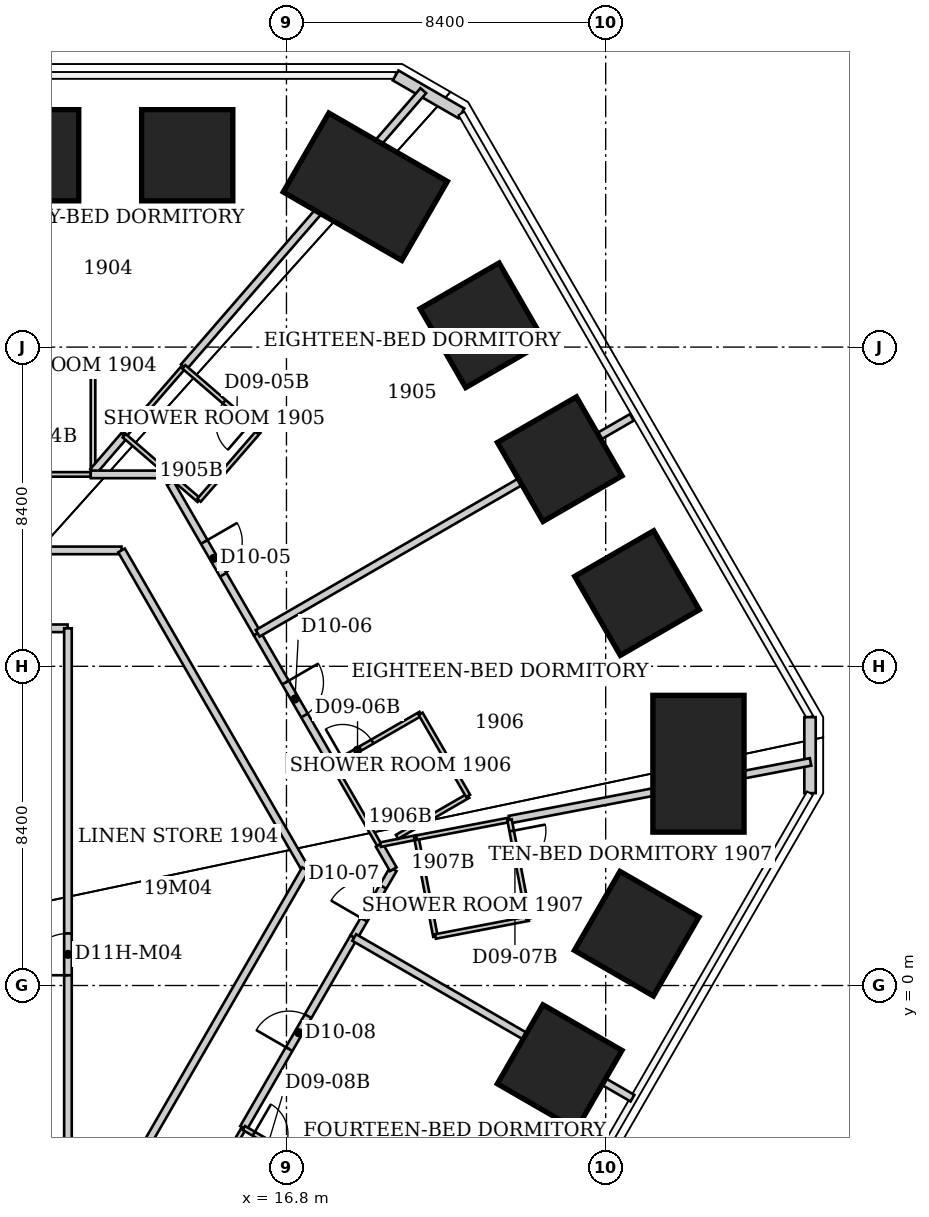
"""IFC4 building model, lengths in metres.
Left out: names, types, materials, properties, quantities, classifications, styles, units other than length and angle.
Written with IfcOpenShell. Run it as: python <this file> out.ifc"""

import sys

from ifc_helpers import new_model, si_unit, direction, frame, frame_2d, origin, origin_2d, place, context, subcontext, project, spatial, rectangle, extrude, element, fill, save


model = new_model("IFC4")
c1 = context("Model", 3, precision=1e-05, world=origin(), true_north=direction((0.0, 1.0)))
c2 = subcontext(c1, "Body", "Model", "MODEL_VIEW")
j1 = project(units=[si_unit("LENGTHUNIT", "METRE"), si_unit("PLANEANGLEUNIT", "RADIAN")], contexts=[c1])
p1 = place(None, origin())
s1 = spatial("IfcSite", under=j1, at=p1, CompositionType="ELEMENT")
p2 = place(p1, origin())
s2 = spatial("IfcBuilding", under=s1, at=p2, CompositionType="ELEMENT")
p3 = place(p2, frame((0.0, 0.0, 80.0)))
s3 = spatial("IfcBuildingStorey", under=s2, at=p3, CompositionType="ELEMENT", Elevation=80.0)
p4 = place(p3, frame((10.135, 21.849, 0.0), z_axis=(-0.017011430722, -0.036719012729, 0.999180827142), x_axis=(-0.001112013962, 0.99932551115, 0.036705397281)))
e1 = element("IfcColumn", 1, at=p4, inside=s3, PredefinedType="COLUMN", context=c2, shape_type="SweptSolid", body=[
    extrude(rectangle(XDim=2.4, YDim=2.4, at=origin_2d()), origin(), (0.0, 0.0, 1.0), 3.803),
])
p5 = place(p3, frame((14.189, 21.848, 0.0), z_axis=(-0.0238126955, -0.036713913278, 0.999042063231), x_axis=(-0.001457588232, 0.999325647249, 0.036689592354)))
e2 = element("IfcColumn", 2, at=p5, inside=s3, PredefinedType="COLUMN", context=c2, shape_type="SweptSolid", body=[
    extrude(rectangle(XDim=2.4, YDim=2.4, at=origin_2d()), origin(), (0.0, 0.0, 1.0), 3.804),
])
p6 = place(p3, frame((18.875, 21.02, 0.0), z_axis=(-0.031958280822, -0.035551983084, 0.998856708836), x_axis=(0.499520046627, 0.86503883454, 0.046771120948)))
e3 = element("IfcColumn", 3, at=p6, inside=s3, PredefinedType="COLUMN", context=c2, shape_type="SweptSolid", body=[
    extrude(rectangle(XDim=2.4, YDim=3.6, at=origin_2d()), origin(), (0.0, 0.0, 1.0), 3.804),
])
p7 = place(p3, frame((21.956, 17.374, 0.0), z_axis=(-0.036324594823, -0.028751622758, 0.998926357646), x_axis=(0.865203233746, 0.499322177845, 0.045833688787)))
e4 = element("IfcColumn", 4, at=p7, inside=s3, PredefinedType="COLUMN", context=c2, shape_type="SweptSolid", body=[
    extrude(rectangle(XDim=2.4, YDim=2.4, at=origin_2d()), origin(), (0.0, 0.0, 1.0), 3.804),
])
p8 = place(p3, frame((23.99, 13.851, 0.0), z_axis=(-0.039726869437, -0.02291194247, 0.998947855865), x_axis=(0.865344046472, 0.499075645542, 0.045860454239)))
e5 = element("IfcColumn", 5, at=p8, inside=s3, PredefinedType="COLUMN", context=c2, shape_type="SweptSolid", body=[
    extrude(rectangle(XDim=2.4, YDim=2.4, at=origin_2d()), origin(), (0.0, 0.0, 1.0), 3.804),
])
p9 = place(p3, frame((26.024, 10.327, 0.0), z_axis=(-0.043063214726, -0.017135437156, 0.998925390773), x_axis=(0.864497674409, 0.500540860582, 0.045854310909)))
e6 = element("IfcColumn", 6, at=p9, inside=s3, PredefinedType="COLUMN", context=c2, shape_type="SweptSolid", body=[
    extrude(rectangle(XDim=2.4, YDim=2.4, at=origin_2d()), origin(), (0.0, 0.0, 1.0), 3.804),
])
p10 = place(p3, frame((27.641, 5.836, 0.0), z_axis=(-0.04678227982, -0.009882676395, 0.998856221386), x_axis=(0.998905103639, -0.000352183695, 0.046781084758)))
e7 = element("IfcColumn", 7, at=p10, inside=s3, PredefinedType="COLUMN", context=c2, shape_type="SweptSolid", body=[
    extrude(rectangle(XDim=2.4, YDim=3.6, at=origin_2d()), origin(), (0.0, 0.0, 1.0), 3.804),
])
p11 = place(p3, frame((26.016, 1.364, 0.0), z_axis=(-0.043710081557, -0.002246479963, 0.99904173191), x_axis=(0.864490436005, -0.501307983687, 0.036695933665)))
e8 = element("IfcColumn", 8, at=p11, inside=s3, PredefinedType="COLUMN", context=c2, shape_type="SweptSolid", body=[
    extrude(rectangle(XDim=2.4, YDim=2.4, at=origin_2d()), origin(), (0.0, 0.0, 1.0), 3.804),
])
p12 = place(p3, frame((23.989, -2.147, 0.0), z_axis=(-0.040313871888, 0.003594867557, 0.999180598621), x_axis=(0.865292276739, -0.499921607788, 0.036710514605)))
e9 = element("IfcColumn", 9, at=p12, inside=s3, PredefinedType="COLUMN", context=c2, shape_type="SweptSolid", body=[
    extrude(rectangle(XDim=2.4, YDim=2.4, at=origin_2d()), origin(), (0.0, 0.0, 1.0), 3.803),
])
for number, where, z_axis, x_axis in (
    (10, (19.672, 23.949, 0.0), (0.0, 0.0, 1.0), (0.866, -0.5, 0.0)),
    (11, (30.576, 7.062, 0.0), (0.0, 0.0, 1.0), (0.0, -1.0, 0.0)),
):
    element("IfcWall", number, at=place(p3, frame(where, z_axis=z_axis, x_axis=x_axis)), inside=s3, PredefinedType="SOLIDWALL", context=c2, shape_type="SweptSolid", body=[
        extrude(rectangle(XDim=2.0, YDim=0.3, at=frame_2d((1.0, 0.0))), origin(), (0.0, 0.0, 1.0), 3.64),
    ])
p13 = place(p3, frame((8.65, 11.45, 0.0), z_axis=(0.0, 0.0, 1.0), x_axis=(1.0, 0.0, 0.0)))
e12 = element("IfcWall", 12, at=p13, inside=s3, PredefinedType="PARTITIONING", context=c2, shape_type="SweptSolid", body=[
    extrude(rectangle(XDim=3.81, YDim=0.2, at=frame_2d((1.905, 0.0))), origin(), (0.0, 0.0, 1.0), 3.64),
])
p14 = place(p3, frame((11.04, 9.4, 0.0), z_axis=(0.0, 0.0, 1.0), x_axis=(-1.0, 0.0, 0.0)))
e13 = element("IfcWall", 13, at=p14, inside=s3, PredefinedType="PARTITIONING", context=c2, shape_type="SweptSolid", body=[
    extrude(rectangle(XDim=2.39, YDim=0.2, at=frame_2d((1.195, 0.0))), origin(), (0.0, 0.0, 1.0), 3.64),
])
p15 = place(p3, frame((11.05, -7.76, 0.0), z_axis=(0.0, 0.0, 1.0), x_axis=(0.0, 1.0, 0.0)))
e14 = element("IfcWall", 14, at=p15, inside=s3, PredefinedType="PARTITIONING", context=c2, shape_type="SweptSolid", body=[
    extrude(rectangle(XDim=17.16, YDim=0.2, at=frame_2d((8.58, 0.0))), origin(), (0.0, 0.0, 1.0), 3.64),
])
p16 = place(p15, frame((8.03, 0.0, 0.0)))
e15 = element("IfcOpeningElement", 15, at=p16, cuts=e14, PredefinedType="OPENING", context=c2, shape_type="SweptSolid", body=[
    extrude(rectangle(XDim=1.1, YDim=2.2, at=frame_2d((0.55, 1.1))), frame((0.0, 0.1, 0.0), z_axis=(0.0, -1.0, 0.0), x_axis=(1.0, 0.0, 0.0)), (0.0, 0.0, 1.0), 0.2),
])
p17 = place(p3, frame((11.65, 13.45, 0.0), z_axis=(0.0, 0.0, 1.0), x_axis=(-1.0, 0.0, 0.0)))
e16 = element("IfcWall", 16, at=p17, inside=s3, PredefinedType="PARTITIONING", context=c2, shape_type="SweptSolid", body=[
    extrude(rectangle(XDim=2.44, YDim=0.12, at=frame_2d((1.22, 0.0))), origin(), (0.0, 0.0, 1.0), 3.64),
])
p18 = place(p3, frame((11.71, 13.605, 0.0), z_axis=(0.0, 0.0, 1.0), x_axis=(0.0, 1.0, 0.0)))
e17 = element("IfcWall", 17, at=p18, inside=s3, PredefinedType="PARTITIONING", context=c2, shape_type="SweptSolid", body=[
    extrude(rectangle(XDim=2.515, YDim=0.12, at=frame_2d((1.258, 0.0))), origin(), (0.0, 0.0, 1.0), 3.64),
])
p19 = place(p3, frame((11.71, 16.12, 0.0), z_axis=(0.0, 0.0, 1.0), x_axis=(-1.0, 0.0, 0.0)))
e18 = element("IfcWall", 18, at=p19, inside=s3, PredefinedType="PARTITIONING", context=c2, shape_type="SweptSolid", body=[
    extrude(rectangle(XDim=2.5, YDim=0.12, at=frame_2d((1.25, 0.0))), origin(), (0.0, 0.0, 1.0), 3.64),
])
p20 = place(p3, frame((11.715, 13.526, 0.0), z_axis=(0.0, 0.0, 1.0), x_axis=(0.653334457224, 0.757069406993, 0.0)))
e19 = element("IfcWall", 19, at=p20, inside=s3, PredefinedType="PARTITIONING", context=c2, shape_type="SweptSolid", body=[
    extrude(rectangle(XDim=1.247, YDim=0.2, at=frame_2d((0.624, 0.0))), origin(), (0.0, 0.0, 1.0), 3.64),
])
p21 = place(p3, frame((12.46, 11.45, 0.0), z_axis=(0.0, 0.0, 1.0), x_axis=(0.499704269421, -0.866196076603, 0.0)))
e20 = element("IfcWall", 20, at=p21, inside=s3, PredefinedType="PARTITIONING", context=c2, shape_type="SweptSolid", body=[
    extrude(rectangle(XDim=9.686, YDim=0.2, at=frame_2d((4.843, 0.0))), origin(), (0.0, 0.0, 1.0), 3.64),
])
p22 = place(p3, frame((12.53, 14.47, 0.0), z_axis=(0.0, 0.0, 1.0), x_axis=(0.655194291402, 0.755460416245, 0.0)))
e21 = element("IfcWall", 21, at=p22, inside=s3, PredefinedType="PARTITIONING", context=c2, shape_type="SweptSolid", body=[
    extrude(rectangle(XDim=2.396, YDim=0.12, at=frame_2d((1.198, 0.0))), origin(), (0.0, 0.0, 1.0), 3.64),
])
p23 = place(p3, frame((12.53, 14.47, 0.0), z_axis=(0.0, 0.0, 1.0), x_axis=(0.757086659925, -0.653314464377, 0.0)))
e22 = element("IfcWall", 22, at=p23, inside=s3, PredefinedType="PARTITIONING", context=c2, shape_type="SweptSolid", body=[
    extrude(rectangle(XDim=2.602, YDim=0.12, at=frame_2d((1.301, 0.0))), origin(), (0.0, 0.0, 1.0), 3.64),
])
p24 = place(p3, frame((13.505, 13.45, 0.0), z_axis=(0.0, 0.0, 1.0), x_axis=(-1.0, 0.0, 0.0)))
e23 = element("IfcWall", 23, at=p24, inside=s3, PredefinedType="PARTITIONING", context=c2, shape_type="SweptSolid", body=[
    extrude(rectangle(XDim=1.855, YDim=0.2, at=frame_2d((0.927, 0.0))), origin(), (0.0, 0.0, 1.0), 3.64),
])
p25 = place(p3, frame((13.742, 13.22, 0.0), z_axis=(0.0, 0.0, 1.0), x_axis=(0.500169095125, -0.865927754655, 0.0)))
e24 = element("IfcWall", 24, at=p25, inside=s3, PredefinedType="PARTITIONING", context=c2, shape_type="SweptSolid", body=[
    extrude(rectangle(XDim=4.574, YDim=0.2, at=frame_2d((2.287, 0.0))), origin(), (0.0, 0.0, 1.0), 3.64),
])
p26 = place(p25, frame((1.787, 0.0, 0.0)))
e25 = element("IfcOpeningElement", 25, at=p26, cuts=e24, PredefinedType="OPENING", context=c2, shape_type="SweptSolid", body=[
    extrude(rectangle(XDim=1.0, YDim=2.13, at=frame_2d((0.5, 1.065))), frame((0.0, 0.1, 0.0), z_axis=(0.0, -1.0, 0.0), x_axis=(1.0, 0.0, 0.0)), (0.0, 0.0, 1.0), 0.2),
])
p27 = place(p3, frame((14.1, 16.28, 0.0), z_axis=(0.0, 0.0, 1.0), x_axis=(0.655045529498, 0.755589408531, 0.0)))
e26 = element("IfcWall", 26, at=p27, inside=s3, PredefinedType="PARTITIONING", context=c2, shape_type="SweptSolid", body=[
    extrude(rectangle(XDim=9.618, YDim=0.2, at=frame_2d((4.809, 0.0))), origin(), (0.0, 0.0, 1.0), 3.64),
])
p28 = place(p3, frame((14.5, 12.77, 0.0), z_axis=(0.0, 0.0, 1.0), x_axis=(0.655252439976, 0.755409981338, 0.0)))
e27 = element("IfcWall", 27, at=p28, inside=s3, PredefinedType="PARTITIONING", context=c2, shape_type="SweptSolid", body=[
    extrude(rectangle(XDim=2.396, YDim=0.12, at=frame_2d((1.198, 0.0))), origin(), (0.0, 0.0, 1.0), 3.64),
])
p29 = place(p3, frame((15.67, -3.75, 0.0), z_axis=(0.0, 0.0, 1.0), x_axis=(0.500237606619, 0.865888178071, 0.0)))
e28 = element("IfcWall", 28, at=p29, inside=s3, PredefinedType="PARTITIONING", context=c2, shape_type="SweptSolid", body=[
    extrude(rectangle(XDim=5.798, YDim=0.2, at=frame_2d((2.899, 0.0))), origin(), (0.0, 0.0, 1.0), 3.64),
])
p30 = place(p29, frame((2.399, 0.0, 0.0)))
e29 = element("IfcOpeningElement", 29, at=p30, cuts=e28, PredefinedType="OPENING", context=c2, shape_type="SweptSolid", body=[
    extrude(rectangle(XDim=1.0, YDim=2.13, at=frame_2d((0.5, 1.065))), frame((0.0, 0.1, 0.0), z_axis=(0.0, -1.0, 0.0), x_axis=(1.0, 0.0, 0.0)), (0.0, 0.0, 1.0), 0.2),
])
p31 = place(p3, frame((15.68, -3.75, 0.0), z_axis=(0.0, 0.0, 1.0), x_axis=(-0.502810888564, -0.864396442809, 0.0)))
e30 = element("IfcWall", 30, at=p31, inside=s3, PredefinedType="PARTITIONING", context=c2, shape_type="SweptSolid", body=[
    extrude(rectangle(XDim=2.406, YDim=0.12, at=frame_2d((1.203, 0.0))), origin(), (0.0, 0.0, 1.0), 3.64),
])
p32 = place(p3, frame((16.03, 9.26, 0.0), z_axis=(0.0, 0.0, 1.0), x_axis=(0.500123041693, -0.865954353975, 0.0)))
e31 = element("IfcWall", 31, at=p32, inside=s3, PredefinedType="PARTITIONING", context=c2, shape_type="SweptSolid", body=[
    extrude(rectangle(XDim=3.974, YDim=0.2, at=frame_2d((1.987, 0.0))), origin(), (0.0, 0.0, 1.0), 3.64),
])
p33 = place(p32, frame((1.487, 0.0, 0.0)))
e32 = element("IfcOpeningElement", 32, at=p33, cuts=e31, PredefinedType="OPENING", context=c2, shape_type="SweptSolid", body=[
    extrude(rectangle(XDim=1.0, YDim=2.13, at=frame_2d((0.5, 1.065))), frame((0.0, 0.1, 0.0), z_axis=(0.0, -1.0, 0.0), x_axis=(1.0, 0.0, 0.0)), (0.0, 0.0, 1.0), 0.2),
])
p34 = place(p3, frame((16.07, 14.58, 0.0), z_axis=(0.0, 0.0, 1.0), x_axis=(-0.757086659925, 0.653314464377, 0.0)))
e33 = element("IfcWall", 33, at=p34, inside=s3, PredefinedType="PARTITIONING", context=c2, shape_type="SweptSolid", body=[
    extrude(rectangle(XDim=2.602, YDim=0.12, at=frame_2d((1.301, 0.0))), origin(), (0.0, 0.0, 1.0), 3.64),
])
p35 = place(p34, frame((0.3, 0.0, 0.0)))
e34 = element("IfcOpeningElement", 34, at=p35, cuts=e33, PredefinedType="OPENING", context=c2, shape_type="SweptSolid", body=[
    extrude(rectangle(XDim=0.9, YDim=2.03, at=frame_2d((0.45, 1.015))), frame((0.0, 0.06, 0.0), z_axis=(0.0, -1.0, 0.0), x_axis=(1.0, 0.0, 0.0)), (0.0, 0.0, 1.0), 0.12),
])
p36 = place(p3, frame((17.3, 3.06, 0.0), z_axis=(0.0, 0.0, 1.0), x_axis=(-0.500175206663, -0.865924224537, 0.0)))
e35 = element("IfcWall", 35, at=p36, inside=s3, PredefinedType="PARTITIONING", context=c2, shape_type="SweptSolid", body=[
    extrude(rectangle(XDim=12.275, YDim=0.2, at=frame_2d((6.138, 0.0))), origin(), (0.0, 0.0, 1.0), 3.64),
])
p37 = place(p3, frame((17.93, -5.06, 0.0), z_axis=(0.0, 0.0, 1.0), x_axis=(-0.864186736834, 0.503171227198, 0.0)))
e36 = element("IfcWall", 36, at=p37, inside=s3, PredefinedType="PARTITIONING", context=c2, shape_type="SweptSolid", body=[
    extrude(rectangle(XDim=2.604, YDim=0.12, at=frame_2d((1.302, 0.0))), origin(), (0.0, 0.0, 1.0), 3.64),
])
p38 = place(p37, frame((1.404, 0.0, 0.0)))
e37 = element("IfcOpeningElement", 37, at=p38, cuts=e36, PredefinedType="OPENING", context=c2, shape_type="SweptSolid", body=[
    extrude(rectangle(XDim=0.9, YDim=2.03, at=frame_2d((0.45, 1.015))), frame((0.0, 0.06, 0.0), z_axis=(0.0, -1.0, 0.0), x_axis=(1.0, 0.0, 0.0)), (0.0, 0.0, 1.0), 0.12),
])
p39 = place(p3, frame((18.018, 5.819, 0.0), z_axis=(0.0, 0.0, 1.0), x_axis=(0.499757016066, -0.866165645181, 0.0)))
e38 = element("IfcWall", 38, at=p39, inside=s3, PredefinedType="PARTITIONING", context=c2, shape_type="SweptSolid", body=[
    extrude(rectangle(XDim=2.446, YDim=0.12, at=frame_2d((1.223, 0.0))), origin(), (0.0, 0.0, 1.0), 3.64),
])
p40 = place(p3, frame((18.57, 1.27, 0.0), z_axis=(0.0, 0.0, 1.0), x_axis=(0.502374475056, 0.864650152843, 0.0)))
e39 = element("IfcWall", 39, at=p40, inside=s3, PredefinedType="PARTITIONING", context=c2, shape_type="SweptSolid", body=[
    extrude(rectangle(XDim=2.07, YDim=0.2, at=frame_2d((1.035, 0.0))), origin(), (0.0, 0.0, 1.0), 3.64),
])
p41 = place(p40, frame((0.535, 0.0, 0.0)))
e40 = element("IfcOpeningElement", 40, at=p41, cuts=e39, PredefinedType="OPENING", context=c2, shape_type="SweptSolid", body=[
    extrude(rectangle(XDim=1.0, YDim=2.13, at=frame_2d((0.5, 1.065))), frame((0.0, 0.1, 0.0), z_axis=(0.0, -1.0, 0.0), x_axis=(1.0, 0.0, 0.0)), (0.0, 0.0, 1.0), 0.2),
])
p42 = place(p3, frame((19.24, 3.7, 0.0), z_axis=(0.0, 0.0, 1.0), x_axis=(0.50068472101, -0.865629718844, 0.0)))
e41 = element("IfcWall", 41, at=p42, inside=s3, PredefinedType="PARTITIONING", context=c2, shape_type="SweptSolid", body=[
    extrude(rectangle(XDim=0.739, YDim=0.2, at=frame_2d((0.37, 0.0))), origin(), (0.0, 0.0, 1.0), 3.64),
])
p43 = place(p3, frame((19.274, 3.707, 0.0), z_axis=(0.0, 0.0, 1.0), x_axis=(0.980619649475, 0.195921165429, 0.0)))
e42 = element("IfcWall", 42, at=p43, inside=s3, PredefinedType="PARTITIONING", context=c2, shape_type="SweptSolid", body=[
    extrude(rectangle(XDim=0.963, YDim=0.12, at=frame_2d((0.481, 0.0))), origin(), (0.0, 0.0, 1.0), 3.64),
])
p44 = place(p3, frame((19.709, 3.912, 0.0), z_axis=(0.0, 0.0, 1.0), x_axis=(0.86650539461, 0.499167708403, 0.0)))
e43 = element("IfcWall", 43, at=p44, inside=s3, PredefinedType="PARTITIONING", context=c2, shape_type="SweptSolid", body=[
    extrude(rectangle(XDim=2.159, YDim=0.12, at=frame_2d((1.08, 0.0))), origin(), (0.0, 0.0, 1.0), 3.64),
])
p45 = place(p3, frame((20.22, 3.89, 0.0), z_axis=(0.0, 0.0, 1.0), x_axis=(0.18885765444, -0.982004473696, 0.0)))
e44 = element("IfcWall", 44, at=p45, inside=s3, PredefinedType="PARTITIONING", context=c2, shape_type="SweptSolid", body=[
    extrude(rectangle(XDim=2.647, YDim=0.12, at=frame_2d((1.324, 0.0))), origin(), (0.0, 0.0, 1.0), 3.64),
])
p46 = place(p3, frame((20.22, 3.89, 0.0), z_axis=(0.0, 0.0, 1.0), x_axis=(0.982075487059, 0.1884880307, 0.0)))
e45 = element("IfcWall", 45, at=p46, inside=s3, PredefinedType="PARTITIONING", context=c2, shape_type="SweptSolid", body=[
    extrude(rectangle(XDim=2.495, YDim=0.12, at=frame_2d((1.247, 0.0))), origin(), (0.0, 0.0, 1.0), 3.64),
])
p47 = place(p3, frame((20.33, 7.15, 0.0), z_axis=(0.0, 0.0, 1.0), x_axis=(-0.866654860089, -0.498908161372, 0.0)))
e46 = element("IfcWall", 46, at=p47, inside=s3, PredefinedType="PARTITIONING", context=c2, shape_type="SweptSolid", body=[
    extrude(rectangle(XDim=2.666, YDim=0.12, at=frame_2d((1.333, 0.0))), origin(), (0.0, 0.0, 1.0), 2.878),
])
p48 = place(p47, frame((1.466, 0.0, 0.0)))
e47 = element("IfcOpeningElement", 47, at=p48, cuts=e46, PredefinedType="OPENING", context=c2, shape_type="SweptSolid", body=[
    extrude(rectangle(XDim=0.9, YDim=2.03, at=frame_2d((0.45, 1.015))), frame((0.0, 0.06, 0.0), z_axis=(0.0, -1.0, 0.0), x_axis=(1.0, 0.0, 0.0)), (0.0, 0.0, 1.0), 0.12),
])
p49 = place(p3, frame((20.72, 1.29, 0.0), z_axis=(0.0, 0.0, 1.0), x_axis=(0.9820935986, 0.188393639991, 0.0)))
e48 = element("IfcWall", 48, at=p49, inside=s3, PredefinedType="PARTITIONING", context=c2, shape_type="SweptSolid", body=[
    extrude(rectangle(XDim=2.495, YDim=0.12, at=frame_2d((1.247, 0.0))), origin(), (0.0, 0.0, 1.0), 3.64),
])
p50 = place(p3, frame((21.58, 4.99, 0.0), z_axis=(0.0, 0.0, 1.0), x_axis=(-0.500893576935, 0.865508881864, 0.0)))
e49 = element("IfcWall", 49, at=p50, inside=s3, PredefinedType="PARTITIONING", context=c2, shape_type="SweptSolid", body=[
    extrude(rectangle(XDim=2.496, YDim=0.12, at=frame_2d((1.248, 0.0))), origin(), (0.0, 0.0, 1.0), 3.64),
])
p51 = place(p3, frame((22.669, 4.366, 0.0), z_axis=(0.0, 0.0, 1.0), x_axis=(0.982123058559, 0.188240000653, 0.0)))
e50 = element("IfcWall", 50, at=p51, inside=s3, PredefinedType="PARTITIONING", context=c2, shape_type="SweptSolid", body=[
    extrude(rectangle(XDim=8.066, YDim=0.2, at=frame_2d((4.033, 0.0))), origin(), (0.0, 0.0, 1.0), 3.64),
])
p52 = place(p3, frame((23.17, 1.76, 0.0), z_axis=(0.0, 0.0, 1.0), x_axis=(-0.18885765444, 0.982004473696, 0.0)))
e51 = element("IfcWall", 51, at=p52, inside=s3, PredefinedType="PARTITIONING", context=c2, shape_type="SweptSolid", body=[
    extrude(rectangle(XDim=2.647, YDim=0.12, at=frame_2d((1.324, 0.0))), origin(), (0.0, 0.0, 1.0), 3.64),
])
p53 = place(p52, frame((1.448, 0.0, 0.0)))
e52 = element("IfcOpeningElement", 52, at=p53, cuts=e51, PredefinedType="OPENING", context=c2, shape_type="SweptSolid", body=[
    extrude(rectangle(XDim=0.9, YDim=2.03, at=frame_2d((0.45, 1.015))), frame((0.0, 0.06, 0.0), z_axis=(0.0, -1.0, 0.0), x_axis=(1.0, 0.0, 0.0)), (0.0, 0.0, 1.0), 0.12),
])
p54 = place(p3, frame((25.886, 14.95, 0.0), z_axis=(0.0, 0.0, 1.0), x_axis=(-0.86604429266, -0.499967282081, 0.0)))
e53 = element("IfcWall", 53, at=p54, inside=s3, PredefinedType="PARTITIONING", context=c2, shape_type="SweptSolid", body=[
    extrude(rectangle(XDim=11.365, YDim=0.2, at=frame_2d((5.683, 0.0))), origin(), (0.0, 0.0, 1.0), 2.86),
])
p55 = place(p3, frame((25.904, -2.965, 0.0), z_axis=(0.0, 0.0, 1.0), x_axis=(-0.865987918257, 0.500064921217, 0.0)))
e54 = element("IfcWall", 54, at=p55, inside=s3, PredefinedType="PARTITIONING", context=c2, shape_type="SweptSolid", body=[
    extrude(rectangle(XDim=8.454, YDim=0.2, at=frame_2d((4.227, 0.0))), origin(), (0.0, 0.0, 1.0), 3.64),
])
p56 = place(p26, origin())
e55 = element("IfcDoor", 55, at=p56, inside=s3, OperationType="SINGLE_SWING_LEFT", PredefinedType="DOOR", context=c2, shape_type="SweptSolid", body=[
    extrude(rectangle(XDim=1.0, YDim=2.13, at=frame_2d((0.5, 1.065))), frame((0.0, 0.025, 0.0), z_axis=(0.0, -1.0, 0.0), x_axis=(1.0, 0.0, 0.0)), (0.0, 0.0, 1.0), 0.05),
])
fill(e25, e55)
p57 = place(p35, origin())
e56 = element("IfcDoor", 56, at=p57, inside=s3, OperationType="SINGLE_SWING_LEFT", PredefinedType="DOOR", context=c2, shape_type="SweptSolid", body=[
    extrude(rectangle(XDim=0.9, YDim=2.03, at=frame_2d((0.45, 1.015))), frame((0.0, 0.025, 0.0), z_axis=(0.0, -1.0, 0.0), x_axis=(1.0, 0.0, 0.0)), (0.0, 0.0, 1.0), 0.05),
])
fill(e34, e56)
p58 = place(p33, origin())
e57 = element("IfcDoor", 57, at=p58, inside=s3, OperationType="SINGLE_SWING_LEFT", PredefinedType="DOOR", context=c2, shape_type="SweptSolid", body=[
    extrude(rectangle(XDim=1.0, YDim=2.13, at=frame_2d((0.5, 1.065))), frame((0.0, 0.025, 0.0), z_axis=(0.0, -1.0, 0.0), x_axis=(1.0, 0.0, 0.0)), (0.0, 0.0, 1.0), 0.05),
])
fill(e32, e57)
p59 = place(p48, origin())
e58 = element("IfcDoor", 58, at=p59, inside=s3, OperationType="SINGLE_SWING_RIGHT", PredefinedType="DOOR", context=c2, shape_type="SweptSolid", body=[
    extrude(rectangle(XDim=0.9, YDim=2.03, at=frame_2d((0.45, 1.015))), frame((0.0, 0.025, 0.0), z_axis=(0.0, -1.0, 0.0), x_axis=(1.0, 0.0, 0.0)), (0.0, 0.0, 1.0), 0.05),
])
fill(e47, e58)
p60 = place(p41, origin())
e59 = element("IfcDoor", 59, at=p60, inside=s3, OperationType="SINGLE_SWING_LEFT", PredefinedType="DOOR", context=c2, shape_type="SweptSolid", body=[
    extrude(rectangle(XDim=1.0, YDim=2.13, at=frame_2d((0.5, 1.065))), frame((0.0, 0.025, 0.0), z_axis=(0.0, -1.0, 0.0), x_axis=(1.0, 0.0, 0.0)), (0.0, 0.0, 1.0), 0.05),
])
fill(e40, e59)
p61 = place(p53, origin())
e60 = element("IfcDoor", 60, at=p61, inside=s3, OperationType="SINGLE_SWING_RIGHT", PredefinedType="DOOR", context=c2, shape_type="SweptSolid", body=[
    extrude(rectangle(XDim=0.9, YDim=2.03, at=frame_2d((0.45, 1.015))), frame((0.0, 0.025, 0.0), z_axis=(0.0, -1.0, 0.0), x_axis=(1.0, 0.0, 0.0)), (0.0, 0.0, 1.0), 0.05),
])
fill(e52, e60)
p62 = place(p30, origin())
e61 = element("IfcDoor", 61, at=p62, inside=s3, OperationType="SINGLE_SWING_LEFT", PredefinedType="DOOR", context=c2, shape_type="SweptSolid", body=[
    extrude(rectangle(XDim=1.0, YDim=2.13, at=frame_2d((0.5, 1.065))), frame((0.0, 0.025, 0.0), z_axis=(0.0, -1.0, 0.0), x_axis=(1.0, 0.0, 0.0)), (0.0, 0.0, 1.0), 0.05),
])
fill(e29, e61)
p63 = place(p38, origin())
e62 = element("IfcDoor", 62, at=p63, inside=s3, OperationType="SINGLE_SWING_RIGHT", PredefinedType="DOOR", context=c2, shape_type="SweptSolid", body=[
    extrude(rectangle(XDim=0.9, YDim=2.03, at=frame_2d((0.45, 1.015))), frame((0.0, 0.025, 0.0), z_axis=(0.0, -1.0, 0.0), x_axis=(1.0, 0.0, 0.0)), (0.0, 0.0, 1.0), 0.05),
])
fill(e37, e62)
p64 = place(p16, origin())
e63 = element("IfcDoor", 63, at=p64, inside=s3, OperationType="SINGLE_SWING_LEFT", PredefinedType="DOOR", context=c2, shape_type="SweptSolid", body=[
    extrude(rectangle(XDim=1.1, YDim=2.2, at=frame_2d((0.55, 1.1))), frame((0.0, 0.025, 0.0), z_axis=(0.0, -1.0, 0.0), x_axis=(1.0, 0.0, 0.0)), (0.0, 0.0, 1.0), 0.05),
])
fill(e15, e63)
save(model, sys.argv[1])
